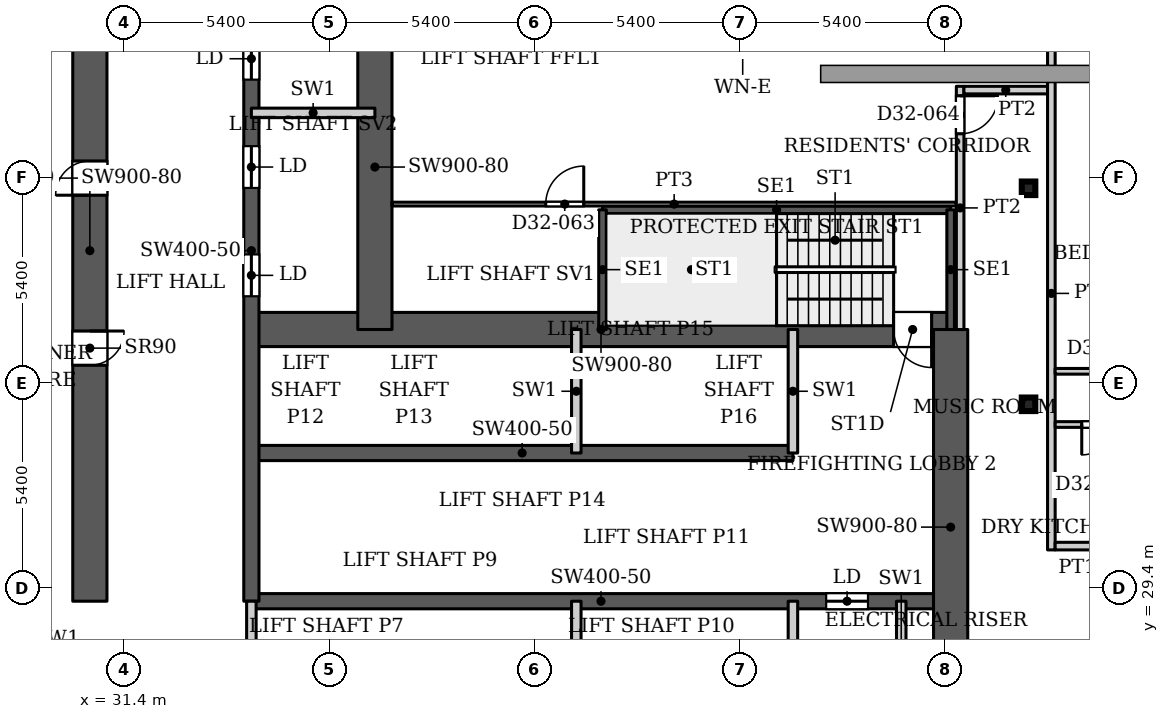
"""IFC4 building model, lengths in metres.
Left out: names, types, materials, properties, quantities, classifications, styles, units other than length and angle.
Written with IfcOpenShell. Run it as: python <this file> out.ifc"""

import sys

from ifc_helpers import new_model, si_unit, direction, frame, frame_2d, origin, origin_2d, place, context, subcontext, project, spatial, rectangle, hollow_rectangle, extrude, source, transform, mapped, element, fill, save


model = new_model("IFC4")
c1 = context("Model", 3, precision=1e-05, world=origin(), true_north=direction((0.0, 1.0)))
c2 = subcontext(c1, "Body", "Model", "MODEL_VIEW")
j1 = project(units=[si_unit("LENGTHUNIT", "METRE"), si_unit("PLANEANGLEUNIT", "RADIAN")], contexts=[c1])
p1 = place(None, origin())
s1 = spatial("IfcSite", under=j1, at=p1, CompositionType="ELEMENT")
p2 = place(p1, origin())
s2 = spatial("IfcBuilding", under=s1, at=p2, CompositionType="ELEMENT")
p3 = place(p2, frame((0.0, 0.0, 140.9)))
s3 = spatial("IfcBuildingStorey", under=s2, at=p3, CompositionType="ELEMENT", Elevation=140.9)
for number, where, z_axis, x_axis in (
    (1, (55.2, 34.232, 0.0), (0.0, 0.0, 1.0), (1.0, 0.0, 0.0)),
    (2, (55.2, 39.916, 0.0), (0.0, 0.0, 1.0), (1.0, 0.0, 0.0)),
):
    element("IfcColumn", number, at=place(p3, frame(where, z_axis=z_axis, x_axis=x_axis)), inside=s3, PredefinedType="COLUMN", context=c2, shape_type="SweptSolid", body=[
        extrude(hollow_rectangle(XDim=0.356, YDim=0.356, WallThickness=0.016, InnerFilletRadius=0.016, OuterFilletRadius=0.032, at=origin_2d()), origin(), (0.0, 0.0, 1.0), 3.9),
    ])
p4 = place(p3, frame((34.75, 29.05, 0.0), z_axis=(0.0, 0.0, 1.0), x_axis=(1.0, 0.0, 0.0)))
e3 = element("IfcWall", 3, at=p4, inside=s3, PredefinedType="SHEAR", context=c2, shape_type="SweptSolid", body=[
    extrude(rectangle(XDim=18.4, YDim=0.4, at=frame_2d((9.2, 0.0))), origin(), (0.0, 0.0, 1.0), 3.9),
])
p5 = place(p4, frame((15.125, 0.0, 0.0)))
e4 = element("IfcOpeningElement", 4, at=p5, cuts=e3, PredefinedType="OPENING", context=c2, shape_type="SweptSolid", body=[
    extrude(rectangle(XDim=1.1, YDim=2.2, at=frame_2d((0.55, 1.1))), frame((0.0, 0.21, 0.0), z_axis=(0.0, -1.0, 0.0), x_axis=(1.0, 0.0, 0.0)), (0.0, 0.0, 1.0), 0.42),
])
p6 = place(p3, frame((34.75, 32.95, 0.0), z_axis=(0.0, 0.0, 1.0), x_axis=(1.0, 0.0, 0.0)))
e5 = element("IfcWall", 5, at=p6, inside=s3, PredefinedType="SHEAR", context=c2, shape_type="SweptSolid", body=[
    extrude(rectangle(XDim=14.25, YDim=0.4, at=frame_2d((7.125, 0.0))), origin(), (0.0, 0.0, 1.0), 3.9),
])
p7 = place(p3, frame((34.75, 36.2, 0.0), z_axis=(0.0, 0.0, 1.0), x_axis=(1.0, 0.0, 0.0)))
e6 = element("IfcWall", 6, at=p7, inside=s3, PredefinedType="SHEAR", context=c2, shape_type="SweptSolid", body=[
    extrude(rectangle(XDim=18.4, YDim=0.9, at=frame_2d((9.2, 0.0))), origin(), (0.0, 0.0, 1.0), 3.9),
])
p8 = place(p7, frame((16.9, 0.0, 0.0)))
e7 = element("IfcOpeningElement", 7, at=p8, cuts=e6, PredefinedType="OPENING", context=c2, shape_type="SweptSolid", body=[
    extrude(rectangle(XDim=1.0, YDim=2.2, at=frame_2d((0.5, 1.1))), frame((0.0, 0.46, 0.0), z_axis=(0.0, -1.0, 0.0), x_axis=(1.0, 0.0, 0.0)), (0.0, 0.0, 1.0), 0.92),
])
p9 = place(p3, frame((34.75, 29.05, 0.0), z_axis=(0.0, 0.0, 1.0), x_axis=(0.0, 1.0, 0.0)))
e8 = element("IfcWall", 8, at=p9, inside=s3, PredefinedType="SHEAR", context=c2, shape_type="SweptSolid", body=[
    extrude(rectangle(XDim=18.45, YDim=0.4, at=frame_2d((9.225, 0.0))), origin(), (0.0, 0.0, 1.0), 3.9),
])
p10 = place(p9, frame((8.025, 0.0, 0.0)))
e9 = element("IfcOpeningElement", 9, at=p10, cuts=e8, PredefinedType="OPENING", context=c2, shape_type="SweptSolid", body=[
    extrude(rectangle(XDim=1.1, YDim=2.2, at=frame_2d((0.55, 1.1))), frame((0.0, 0.21, 0.0), z_axis=(0.0, -1.0, 0.0), x_axis=(1.0, 0.0, 0.0)), (0.0, 0.0, 1.0), 0.42),
])
p11 = place(p9, frame((10.875, 0.0, 0.0)))
e10 = element("IfcOpeningElement", 10, at=p11, cuts=e8, PredefinedType="OPENING", context=c2, shape_type="SweptSolid", body=[
    extrude(rectangle(XDim=1.1, YDim=2.2, at=frame_2d((0.55, 1.1))), frame((0.0, 0.21, 0.0), z_axis=(0.0, -1.0, 0.0), x_axis=(1.0, 0.0, 0.0)), (0.0, 0.0, 1.0), 0.42),
])
p12 = place(p9, frame((13.725, 0.0, 0.0)))
e11 = element("IfcOpeningElement", 11, at=p12, cuts=e8, PredefinedType="OPENING", context=c2, shape_type="SweptSolid", body=[
    extrude(rectangle(XDim=1.1, YDim=2.2, at=frame_2d((0.55, 1.1))), frame((0.0, 0.21, 0.0), z_axis=(0.0, -1.0, 0.0), x_axis=(1.0, 0.0, 0.0)), (0.0, 0.0, 1.0), 0.42),
])
p13 = place(p9, frame((15.95, 0.0, 0.0)))
e12 = element("IfcOpeningElement", 12, at=p13, cuts=e8, PredefinedType="OPENING", context=c2, shape_type="SweptSolid", body=[
    extrude(rectangle(XDim=1.1, YDim=2.2, at=frame_2d((0.55, 1.1))), frame((0.0, 0.21, 0.0), z_axis=(0.0, -1.0, 0.0), x_axis=(1.0, 0.0, 0.0)), (0.0, 0.0, 1.0), 0.42),
])
p14 = place(p3, frame((38.0, 36.2, 0.0), z_axis=(0.0, 0.0, 1.0), x_axis=(0.0, 1.0, 0.0)))
e13 = element("IfcWall", 13, at=p14, inside=s3, PredefinedType="SHEAR", context=c2, shape_type="SweptSolid", body=[
    extrude(rectangle(XDim=8.55, YDim=0.9, at=frame_2d((4.275, 0.0))), origin(), (0.0, 0.0, 1.0), 3.9),
])
p15 = place(p3, frame((30.5, 29.05, 0.0), z_axis=(0.0, 0.0, 1.0), x_axis=(0.0, 1.0, 0.0)))
e14 = element("IfcWall", 14, at=p15, inside=s3, PredefinedType="SHEAR", context=c2, shape_type="SweptSolid", body=[
    extrude(rectangle(XDim=18.45, YDim=0.9, at=frame_2d((9.225, 0.0))), origin(), (0.0, 0.0, 1.0), 3.9),
])
p16 = place(p15, frame((6.21, 0.0, 0.0)))
e15 = element("IfcOpeningElement", 15, at=p16, cuts=e14, PredefinedType="OPENING", context=c2, shape_type="SweptSolid", body=[
    extrude(rectangle(XDim=0.9, YDim=2.2, at=frame_2d((0.45, 1.1))), frame((0.0, 0.46, 0.0), z_axis=(0.0, -1.0, 0.0), x_axis=(1.0, 0.0, 0.0)), (0.0, 0.0, 1.0), 0.92),
])
p17 = place(p15, frame((10.684, 0.0, 0.0)))
e16 = element("IfcOpeningElement", 16, at=p17, cuts=e14, PredefinedType="OPENING", context=c2, shape_type="SweptSolid", body=[
    extrude(rectangle(XDim=0.9, YDim=2.2, at=frame_2d((0.45, 1.1))), frame((0.0, 0.46, 0.0), z_axis=(0.0, -1.0, 0.0), x_axis=(1.0, 0.0, 0.0)), (0.0, 0.0, 1.0), 0.92),
])
p18 = place(p3, frame((53.15, 25.8, 0.0), z_axis=(0.0, 0.0, 1.0), x_axis=(0.0, 1.0, 0.0)))
e17 = element("IfcWall", 17, at=p18, inside=s3, PredefinedType="SHEAR", context=c2, shape_type="SweptSolid", body=[
    extrude(rectangle(XDim=10.4, YDim=0.9, at=frame_2d((5.2, 0.0))), origin(), (0.0, 0.0, 1.0), 3.9),
])
p19 = place(p3, frame((29.712, 26.072, 0.0), z_axis=(0.0, 0.0, 1.0), x_axis=(-0.511028049012, 0.859564036662, 0.0)))
e18 = element("IfcWall", 18, at=p19, inside=s3, PredefinedType="SOLIDWALL", context=c2, shape_type="SweptSolid", body=[
    extrude(rectangle(XDim=4.634, YDim=0.25, at=frame_2d((2.317, 0.0))), origin(), (0.0, 0.0, 1.0), 3.147),
])
p20 = place(p3, frame((27.195, 31.969, 0.0), z_axis=(0.0, 0.0, 1.0), x_axis=(0.052554995867, 0.998618031286, 0.0)))
e19 = element("IfcWall", 19, at=p20, inside=s3, PredefinedType="SOLIDWALL", context=c2, shape_type="SweptSolid", body=[
    extrude(rectangle(XDim=66.787, YDim=0.25, at=frame_2d((33.394, 0.0))), origin(), (0.0, 0.0, 1.0), 3.75),
])
p21 = place(p3, frame((43.99, 39.35, 0.0), z_axis=(0.0, 0.0, 1.0), x_axis=(1.0, 0.0, 0.0)))
e20 = element("IfcWall", 20, at=p21, inside=s3, PredefinedType="SHEAR", context=c2, shape_type="SweptSolid", body=[
    extrude(rectangle(XDim=9.16, YDim=0.2, at=frame_2d((4.58, 0.0))), origin(), (0.0, 0.0, 1.0), 3.9),
])
for number, where, z_axis, x_axis in (
    (21, (43.99, 36.2, 0.0), (0.0, 0.0, 1.0), (0.0, 1.0, 0.0)),
    (22, (53.15, 36.2, 0.0), (0.0, 0.0, 1.0), (0.0, 1.0, 0.0)),
):
    element("IfcWall", number, at=place(p3, frame(where, z_axis=z_axis, x_axis=x_axis)), inside=s3, PredefinedType="SHEAR", context=c2, shape_type="SweptSolid", body=[
        extrude(rectangle(XDim=3.15, YDim=0.2, at=frame_2d((1.575, 0.0))), origin(), (0.0, 0.0, 1.0), 3.9),
    ])
for number, where, z_axis, x_axis in (
    (23, (34.75, 25.8, 0.0), (0.0, 0.0, 1.0), (0.0, 1.0, 0.0)),
    (24, (43.3, 25.8, 0.0), (0.0, 0.0, 1.0), (0.0, 1.0, 0.0)),
    (25, (43.3, 32.95, 0.0), (0.0, 0.0, 1.0), (0.0, 1.0, 0.0)),
    (26, (49.0, 25.8, 0.0), (0.0, 0.0, 1.0), (0.0, 1.0, 0.0)),
    (27, (49.0, 32.95, 0.0), (0.0, 0.0, 1.0), (0.0, 1.0, 0.0)),
    (28, (51.85, 25.8, 0.0), (0.0, 0.0, 1.0), (0.0, 1.0, 0.0)),
    (29, (34.75, 41.9, 0.0), (0.0, 0.0, 1.0), (1.0, 0.0, 0.0)),
):
    element("IfcWall", number, at=place(p3, frame(where, z_axis=z_axis, x_axis=x_axis)), inside=s3, PredefinedType="PARTITIONING", context=c2, shape_type="SweptSolid", body=[
        extrude(rectangle(XDim=3.25, YDim=0.25, at=frame_2d((1.625, 0.0))), origin(), (0.0, 0.0, 1.0), 3.9),
    ])
p22 = place(p3, frame((38.449, 39.5, 0.0), z_axis=(0.0, 0.0, 1.0), x_axis=(1.0, 0.0, 0.0)))
e30 = element("IfcWall", 30, at=p22, inside=s3, PredefinedType="PARTITIONING", context=c2, shape_type="SweptSolid", body=[
    extrude(rectangle(XDim=14.851, YDim=0.1, at=frame_2d((7.426, 0.0))), origin(), (0.0, 0.0, 1.0), 3.6),
])
p23 = place(p22, frame((4.047, 0.0, 0.0)))
e31 = element("IfcOpeningElement", 31, at=p23, cuts=e30, PredefinedType="OPENING", context=c2, shape_type="SweptSolid", body=[
    extrude(rectangle(XDim=1.0, YDim=2.1, at=frame_2d((0.5, 1.05))), frame((0.0, 0.06, 0.0), z_axis=(0.0, -1.0, 0.0), x_axis=(1.0, 0.0, 0.0)), (0.0, 0.0, 1.0), 0.12),
])
p24 = place(p3, frame((53.4, 36.199, 0.0), z_axis=(0.0, 0.0, 1.0), x_axis=(0.0, 1.0, 0.0)))
e32 = element("IfcWall", 32, at=p24, inside=s3, PredefinedType="PARTITIONING", context=c2, shape_type="SweptSolid", body=[
    extrude(rectangle(XDim=6.401, YDim=0.2, at=frame_2d((3.201, 0.0))), origin(), (0.0, 0.0, 1.0), 3.6),
])
p25 = place(p24, frame((5.151, 0.0, 0.0)))
e33 = element("IfcOpeningElement", 33, at=p25, cuts=e32, PredefinedType="OPENING", context=c2, shape_type="SweptSolid", body=[
    extrude(rectangle(XDim=1.0, YDim=2.1, at=frame_2d((0.5, 1.05))), frame((0.0, 0.11, 0.0), z_axis=(0.0, -1.0, 0.0), x_axis=(1.0, 0.0, 0.0)), (0.0, 0.0, 1.0), 0.22),
])
p26 = place(p3, frame((53.5, 42.5, 0.0), z_axis=(0.0, 0.0, 1.0), x_axis=(1.0, 0.0, 0.0)))
e34 = element("IfcWall", 34, at=p26, inside=s3, PredefinedType="PARTITIONING", context=c2, shape_type="SweptSolid", body=[
    extrude(rectangle(XDim=2.2, YDim=0.2, at=frame_2d((1.1, 0.0))), origin(), (0.0, 0.0, 1.0), 3.6),
])
p27 = place(p3, frame((55.8, 30.4, 0.0), z_axis=(0.0, 0.0, 1.0), x_axis=(0.0, 1.0, 0.0)))
e35 = element("IfcWall", 35, at=p27, inside=s3, PredefinedType="PARTITIONING", context=c2, shape_type="SweptSolid", body=[
    extrude(rectangle(XDim=13.5, YDim=0.2, at=frame_2d((6.75, 0.0))), origin(), (0.0, 0.0, 1.0), 3.6),
])
p28 = place(p3, frame((55.9, 30.5, 0.0), z_axis=(0.0, 0.0, 1.0), x_axis=(1.0, 0.0, 0.0)))
e36 = element("IfcWall", 36, at=p28, inside=s3, PredefinedType="PARTITIONING", context=c2, shape_type="SweptSolid", body=[
    extrude(rectangle(XDim=42.2, YDim=0.2, at=frame_2d((21.1, 0.0))), origin(), (0.0, 0.0, 1.0), 3.6),
])
p29 = place(p28, frame((16.05, 0.0, 0.0)))
e37 = element("IfcOpeningElement", 37, at=p29, cuts=e36, PredefinedType="OPENING", context=c2, shape_type="SweptSolid", body=[
    extrude(rectangle(XDim=1.0, YDim=2.1, at=frame_2d((0.5, 1.05))), frame((0.0, 0.11, 0.0), z_axis=(0.0, -1.0, 0.0), x_axis=(1.0, 0.0, 0.0)), (0.0, 0.0, 1.0), 0.22),
])
p30 = place(p28, frame((22.8, 0.0, 0.0)))
e38 = element("IfcOpeningElement", 38, at=p30, cuts=e36, PredefinedType="OPENING", context=c2, shape_type="SweptSolid", body=[
    extrude(rectangle(XDim=1.0, YDim=2.1, at=frame_2d((0.5, 1.05))), frame((0.0, 0.11, 0.0), z_axis=(0.0, -1.0, 0.0), x_axis=(1.0, 0.0, 0.0)), (0.0, 0.0, 1.0), 0.22),
])
p31 = place(p28, frame((29.55, 0.0, 0.0)))
e39 = element("IfcOpeningElement", 39, at=p31, cuts=e36, PredefinedType="OPENING", context=c2, shape_type="SweptSolid", body=[
    extrude(rectangle(XDim=1.0, YDim=2.1, at=frame_2d((0.5, 1.05))), frame((0.0, 0.11, 0.0), z_axis=(0.0, -1.0, 0.0), x_axis=(1.0, 0.0, 0.0)), (0.0, 0.0, 1.0), 0.22),
])
p32 = place(p3, frame((55.9, 33.7, 0.0), z_axis=(0.0, 0.0, 1.0), x_axis=(1.0, 0.0, 0.0)))
e40 = element("IfcWall", 40, at=p32, inside=s3, PredefinedType="PARTITIONING", context=c2, shape_type="SweptSolid", body=[
    extrude(rectangle(XDim=15.575, YDim=0.15, at=frame_2d((7.788, 0.0))), origin(), (0.0, 0.0, 1.0), 3.6),
])
p33 = place(p32, frame((3.1, 0.0, 0.0)))
e41 = element("IfcOpeningElement", 41, at=p33, cuts=e40, PredefinedType="OPENING", context=c2, shape_type="SweptSolid", body=[
    extrude(rectangle(XDim=0.8, YDim=2.1, at=frame_2d((0.4, 1.05))), frame((0.0, 0.085, 0.0), z_axis=(0.0, -1.0, 0.0), x_axis=(1.0, 0.0, 0.0)), (0.0, 0.0, 1.0), 0.17),
])
p34 = place(p32, frame((8.8, 0.0, 0.0)))
e42 = element("IfcOpeningElement", 42, at=p34, cuts=e40, PredefinedType="OPENING", context=c2, shape_type="SweptSolid", body=[
    extrude(rectangle(XDim=0.8, YDim=2.1, at=frame_2d((0.4, 1.05))), frame((0.0, 0.085, 0.0), z_axis=(0.0, -1.0, 0.0), x_axis=(1.0, 0.0, 0.0)), (0.0, 0.0, 1.0), 0.17),
])
p35 = place(p32, frame((0.7, 0.0, 0.0)))
e43 = element("IfcOpeningElement", 43, at=p35, cuts=e40, PredefinedType="OPENING", context=c2, shape_type="SweptSolid", body=[
    extrude(rectangle(XDim=0.8, YDim=2.1, at=frame_2d((0.4, 1.05))), frame((0.0, 0.085, 0.0), z_axis=(0.0, -1.0, 0.0), x_axis=(1.0, 0.0, 0.0)), (0.0, 0.0, 1.0), 0.17),
])
p36 = place(p32, frame((11.6, 0.0, 0.0)))
e44 = element("IfcOpeningElement", 44, at=p36, cuts=e40, PredefinedType="OPENING", context=c2, shape_type="SweptSolid", body=[
    extrude(rectangle(XDim=0.9, YDim=2.1, at=frame_2d((0.45, 1.05))), frame((0.0, 0.085, 0.0), z_axis=(0.0, -1.0, 0.0), x_axis=(1.0, 0.0, 0.0)), (0.0, 0.0, 1.0), 0.17),
])
p37 = place(p32, frame((6.7, 0.0, 0.0)))
e45 = element("IfcOpeningElement", 45, at=p37, cuts=e40, PredefinedType="OPENING", context=c2, shape_type="SweptSolid", body=[
    extrude(rectangle(XDim=0.8, YDim=2.1, at=frame_2d((0.4, 1.05))), frame((0.0, 0.085, 0.0), z_axis=(0.0, -1.0, 0.0), x_axis=(1.0, 0.0, 0.0)), (0.0, 0.0, 1.0), 0.17),
])
p38 = place(p32, frame((14.2, 0.0, 0.0)))
e46 = element("IfcOpeningElement", 46, at=p38, cuts=e40, PredefinedType="OPENING", context=c2, shape_type="SweptSolid", body=[
    extrude(rectangle(XDim=0.8, YDim=2.1, at=frame_2d((0.4, 1.05))), frame((0.0, 0.085, 0.0), z_axis=(0.0, -1.0, 0.0), x_axis=(1.0, 0.0, 0.0)), (0.0, 0.0, 1.0), 0.17),
])
p39 = place(p3, frame((55.9, 35.1, 0.0), z_axis=(0.0, 0.0, 1.0), x_axis=(1.0, 0.0, 0.0)))
e47 = element("IfcWall", 47, at=p39, inside=s3, PredefinedType="PARTITIONING", context=c2, shape_type="SweptSolid", body=[
    extrude(rectangle(XDim=17.5, YDim=0.15, at=frame_2d((8.75, 0.0))), origin(), (0.0, 0.0, 1.0), 3.6),
])
p40 = place(p39, frame((0.95, 0.0, 0.0)))
e48 = element("IfcOpeningElement", 48, at=p40, cuts=e47, PredefinedType="OPENING", context=c2, shape_type="SweptSolid", body=[
    extrude(rectangle(XDim=0.9, YDim=2.1, at=frame_2d((0.45, 1.05))), frame((0.0, 0.085, 0.0), z_axis=(0.0, -1.0, 0.0), x_axis=(1.0, 0.0, 0.0)), (0.0, 0.0, 1.0), 0.17),
])
p41 = place(p39, frame((15.35, 0.0, 0.0)))
e49 = element("IfcOpeningElement", 49, at=p41, cuts=e47, PredefinedType="OPENING", context=c2, shape_type="SweptSolid", body=[
    extrude(rectangle(XDim=0.9, YDim=2.1, at=frame_2d((0.45, 1.05))), frame((0.0, 0.085, 0.0), z_axis=(0.0, -1.0, 0.0), x_axis=(1.0, 0.0, 0.0)), (0.0, 0.0, 1.0), 0.17),
])
p42 = place(p39, frame((7.5, 0.0, 0.0)))
e50 = element("IfcOpeningElement", 50, at=p42, cuts=e47, PredefinedType="OPENING", context=c2, shape_type="SweptSolid", body=[
    extrude(rectangle(XDim=1.0, YDim=2.1, at=frame_2d((0.5, 1.05))), frame((0.0, 0.085, 0.0), z_axis=(0.0, -1.0, 0.0), x_axis=(1.0, 0.0, 0.0)), (0.0, 0.0, 1.0), 0.17),
])
p43 = place(p39, frame((3.6, 0.0, 0.0)))
e51 = element("IfcOpeningElement", 51, at=p43, cuts=e47, PredefinedType="OPENING", context=c2, shape_type="SweptSolid", body=[
    extrude(rectangle(XDim=1.6, YDim=2.1, at=frame_2d((0.8, 1.05))), frame((0.0, 0.085, 0.0), z_axis=(0.0, -1.0, 0.0), x_axis=(1.0, 0.0, 0.0)), (0.0, 0.0, 1.0), 0.17),
])
p44 = place(p39, frame((10.55, 0.0, 0.0)))
e52 = element("IfcOpeningElement", 52, at=p44, cuts=e47, PredefinedType="OPENING", context=c2, shape_type="SweptSolid", body=[
    extrude(rectangle(XDim=0.9, YDim=2.1, at=frame_2d((0.45, 1.05))), frame((0.0, 0.085, 0.0), z_axis=(0.0, -1.0, 0.0), x_axis=(1.0, 0.0, 0.0)), (0.0, 0.0, 1.0), 0.17),
])
m1 = source(origin(), c2, "Body", "SweptSolid", [
    extrude(rectangle(XDim=1.1, YDim=2.2, at=frame_2d((0.55, 1.1))), frame((0.0, 0.025, 0.0), z_axis=(0.0, -1.0, 0.0), x_axis=(1.0, 0.0, 0.0)), (0.0, 0.0, 1.0), 0.05),
])
p45 = place(p10, origin())
e53 = element("IfcDoor", 53, at=p45, inside=s3, OperationType="SLIDING_TO_LEFT", PredefinedType="DOOR", context=c2, shape_type="MappedRepresentation", body=[
    mapped(m1, transform((0.0, 0.0, 0.0), x_axis=(1.0, 0.0, 0.0), y_axis=(0.0, 1.0, 0.0), z_axis=(0.0, 0.0, 1.0), scale=1.0)),
])
fill(e9, e53)
p46 = place(p11, origin())
e54 = element("IfcDoor", 54, at=p46, inside=s3, OperationType="SLIDING_TO_LEFT", PredefinedType="DOOR", context=c2, shape_type="MappedRepresentation", body=[
    mapped(m1, transform((0.0, 0.0, 0.0), x_axis=(1.0, 0.0, 0.0), y_axis=(0.0, 1.0, 0.0), z_axis=(0.0, 0.0, 1.0), scale=1.0)),
])
fill(e10, e54)
p47 = place(p12, origin())
e55 = element("IfcDoor", 55, at=p47, inside=s3, OperationType="SLIDING_TO_LEFT", PredefinedType="DOOR", context=c2, shape_type="MappedRepresentation", body=[
    mapped(m1, transform((0.0, 0.0, 0.0), x_axis=(1.0, 0.0, 0.0), y_axis=(0.0, 1.0, 0.0), z_axis=(0.0, 0.0, 1.0), scale=1.0)),
])
fill(e11, e55)
p48 = place(p5, origin())
e56 = element("IfcDoor", 56, at=p48, inside=s3, OperationType="SLIDING_TO_LEFT", PredefinedType="DOOR", context=c2, shape_type="MappedRepresentation", body=[
    mapped(m1, transform((0.0, 0.0, 0.0), x_axis=(1.0, 0.0, 0.0), y_axis=(0.0, 1.0, 0.0), z_axis=(0.0, 0.0, 1.0), scale=1.0)),
])
fill(e4, e56)
m2 = source(origin(), c2, "Body", "SweptSolid", [
    extrude(rectangle(XDim=0.9, YDim=2.2, at=frame_2d((0.45, 1.1))), frame((0.0, 0.025, 0.0), z_axis=(0.0, -1.0, 0.0), x_axis=(1.0, 0.0, 0.0)), (0.0, 0.0, 1.0), 0.05),
])
p49 = place(p16, origin())
e57 = element("IfcDoor", 57, at=p49, inside=s3, OperationType="SINGLE_SWING_RIGHT", PredefinedType="DOOR", context=c2, shape_type="MappedRepresentation", body=[
    mapped(m2, transform((0.0, 0.0, 0.0), x_axis=(1.0, 0.0, 0.0), y_axis=(0.0, 1.0, 0.0), z_axis=(0.0, 0.0, 1.0), scale=1.0)),
])
fill(e15, e57)
p50 = place(p17, origin())
e58 = element("IfcDoor", 58, at=p50, inside=s3, OperationType="SINGLE_SWING_LEFT", PredefinedType="DOOR", context=c2, shape_type="MappedRepresentation", body=[
    mapped(m2, transform((0.0, 0.0, 0.0), x_axis=(1.0, 0.0, 0.0), y_axis=(0.0, 1.0, 0.0), z_axis=(0.0, 0.0, 1.0), scale=1.0)),
])
fill(e16, e58)
m3 = source(origin(), c2, "Body", "SweptSolid", [
    extrude(rectangle(XDim=1.0, YDim=2.2, at=frame_2d((0.5, 1.1))), frame((0.0, 0.025, 0.0), z_axis=(0.0, -1.0, 0.0), x_axis=(1.0, 0.0, 0.0)), (0.0, 0.0, 1.0), 0.05),
])
p51 = place(p8, origin())
e59 = element("IfcDoor", 59, at=p51, inside=s3, OperationType="SINGLE_SWING_RIGHT", PredefinedType="DOOR", context=c2, shape_type="MappedRepresentation", body=[
    mapped(m3, transform((0.0, 0.0, 0.0), x_axis=(1.0, 0.0, 0.0), y_axis=(0.0, 1.0, 0.0), z_axis=(0.0, 0.0, 1.0), scale=1.0)),
])
fill(e7, e59)
m4 = source(origin(), c2, "Body", "SweptSolid", [
    extrude(rectangle(XDim=0.8, YDim=2.1, at=frame_2d((0.4, 1.05))), frame((0.0, 0.025, 0.0), z_axis=(0.0, -1.0, 0.0), x_axis=(1.0, 0.0, 0.0)), (0.0, 0.0, 1.0), 0.05),
])
p52 = place(p35, origin())
e60 = element("IfcDoor", 60, at=p52, inside=s3, OperationType="SINGLE_SWING_RIGHT", PredefinedType="DOOR", context=c2, shape_type="MappedRepresentation", body=[
    mapped(m4, transform((0.0, 0.0, 0.0), x_axis=(1.0, 0.0, 0.0), y_axis=(0.0, 1.0, 0.0), z_axis=(0.0, 0.0, 1.0), scale=1.0)),
])
fill(e43, e60)
m5 = source(origin(), c2, "Body", "SweptSolid", [
    extrude(rectangle(XDim=1.0, YDim=2.1, at=frame_2d((0.5, 1.05))), frame((0.0, 0.025, 0.0), z_axis=(0.0, -1.0, 0.0), x_axis=(1.0, 0.0, 0.0)), (0.0, 0.0, 1.0), 0.05),
])
p53 = place(p23, origin())
e61 = element("IfcDoor", 61, at=p53, inside=s3, OperationType="SINGLE_SWING_LEFT", PredefinedType="DOOR", context=c2, shape_type="MappedRepresentation", body=[
    mapped(m5, transform((0.0, 0.0, 0.0), x_axis=(1.0, 0.0, 0.0), y_axis=(0.0, 1.0, 0.0), z_axis=(0.0, 0.0, 1.0), scale=1.0)),
])
fill(e31, e61)
m6 = source(origin(), c2, "Body", "SweptSolid", [
    extrude(rectangle(XDim=1.0, YDim=2.1, at=frame_2d((0.5, 1.05))), frame((0.0, 0.025, 0.0), z_axis=(0.0, -1.0, 0.0), x_axis=(1.0, 0.0, 0.0)), (0.0, 0.0, 1.0), 0.05),
])
p54 = place(p25, origin())
e62 = element("IfcDoor", 62, at=p54, inside=s3, OperationType="SINGLE_SWING_RIGHT", PredefinedType="DOOR", context=c2, shape_type="MappedRepresentation", body=[
    mapped(m6, transform((0.0, 0.0, 0.0), x_axis=(1.0, 0.0, 0.0), y_axis=(0.0, 1.0, 0.0), z_axis=(0.0, 0.0, 1.0), scale=1.0)),
])
fill(e33, e62)
save(model, sys.argv[1])
